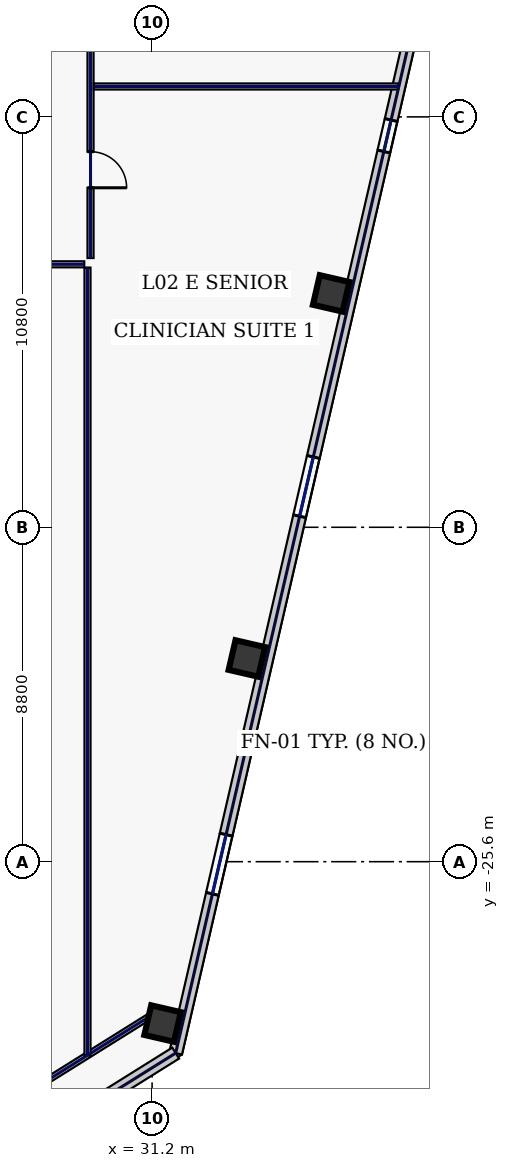
"""IFC4 building model, lengths in metres.
Left out: names, types, materials, properties, quantities, classifications, styles, units other than length and angle.
Written with IfcOpenShell. Run it as: python <this file> out.ifc"""

import sys

from ifc_helpers import new_model, si_unit, direction, frame, frame_2d, origin, origin_2d, place, context, subcontext, project, spatial, rectangle, hollow_rectangle, extrude, element, fill, save


model = new_model("IFC4")
c1 = context("Model", 3, precision=1e-05, world=origin(), true_north=direction((0.0, 1.0)))
c2 = subcontext(c1, "Body", "Model", "MODEL_VIEW")
j1 = project(units=[si_unit("LENGTHUNIT", "METRE"), si_unit("PLANEANGLEUNIT", "RADIAN")], contexts=[c1])
p1 = place(None, origin())
s1 = spatial("IfcSite", under=j1, at=p1, CompositionType="ELEMENT")
p2 = place(p1, origin())
s2 = spatial("IfcBuilding", under=s1, at=p2, CompositionType="ELEMENT")
p3 = place(p2, frame((0.0, 0.0, 13.4)))
s3 = spatial("IfcBuildingStorey", under=s2, at=p3, CompositionType="ELEMENT", Elevation=13.4)
for number, where, z_axis, x_axis in (
    (1, (31.476, -29.86, 0.0), (0.0, 0.0, 1.0), (0.974, -0.225, 0.0)),
    (2, (33.694, -20.252, 0.0), (0.0, 0.0, 1.0), (0.974, -0.225, 0.0)),
    (3, (35.912, -10.645, 0.0), (0.0, 0.0, 1.0), (0.974, -0.225, 0.0)),
):
    element("IfcColumn", number, at=place(p3, frame(where, z_axis=z_axis, x_axis=x_axis)), inside=s3, PredefinedType="COLUMN", context=c2, shape_type="SweptSolid", body=[
        extrude(hollow_rectangle(XDim=0.8, YDim=0.8, WallThickness=0.036, at=origin_2d()), origin(), (0.0, 0.0, 1.0), 4.7),
    ])
p4 = place(p3, frame((31.82, -30.637, 0.0), z_axis=(0.0, 0.0, 1.0), x_axis=(0.224949969076, 0.974370315338, 0.0)))
e4 = element("IfcWall", 4, at=p4, inside=s3, PredefinedType="STANDARD", context=c2, shape_type="SweptSolid", body=[
    extrude(rectangle(XDim=40.8, YDim=0.34, at=frame_2d((20.4, 0.0))), origin(), (0.0, 0.0, 1.0), 4.7),
])
p5 = place(p4, frame((4.3, 0.0, 0.58)))
e5 = element("IfcOpeningElement", 5, at=p5, cuts=e4, PredefinedType="OPENING", context=c2, shape_type="SweptSolid", body=[
    extrude(rectangle(XDim=1.6, YDim=2.3, at=frame_2d((0.8, 1.15))), frame((0.0, 0.18, 0.0), z_axis=(0.0, -1.0, 0.0), x_axis=(1.0, 0.0, 0.0)), (0.0, 0.0, 1.0), 0.36),
])
p6 = place(p4, frame((14.5, 0.0, 0.58)))
e6 = element("IfcOpeningElement", 6, at=p6, cuts=e4, PredefinedType="OPENING", context=c2, shape_type="SweptSolid", body=[
    extrude(rectangle(XDim=1.6, YDim=2.3, at=frame_2d((0.8, 1.15))), frame((0.0, 0.18, 0.0), z_axis=(0.0, -1.0, 0.0), x_axis=(1.0, 0.0, 0.0)), (0.0, 0.0, 1.0), 0.36),
])
p7 = place(p4, frame((24.35, 0.0, 0.75)))
e7 = element("IfcOpeningElement", 7, at=p7, cuts=e4, PredefinedType="OPENING", context=c2, shape_type="SweptSolid", body=[
    extrude(rectangle(XDim=0.85, YDim=1.85, at=frame_2d((0.425, 0.925))), frame((0.0, 0.18, 0.0), z_axis=(0.0, -1.0, 0.0), x_axis=(1.0, 0.0, 0.0)), (0.0, 0.0, 1.0), 0.36),
])
p8 = place(p4, frame((34.55, 0.0, 0.75)))
e8 = element("IfcOpeningElement", 8, at=p8, cuts=e4, PredefinedType="OPENING", context=c2, shape_type="SweptSolid", body=[
    extrude(rectangle(XDim=0.85, YDim=1.85, at=frame_2d((0.425, 0.925))), frame((0.0, 0.18, 0.0), z_axis=(0.0, -1.0, 0.0), x_axis=(1.0, 0.0, 0.0)), (0.0, 0.0, 1.0), 0.36),
])
p9 = place(p3, frame((25.788, -34.406, 0.0), z_axis=(0.0, 0.0, 1.0), x_axis=(0.848046504656, 0.529921811158, 0.0)))
e9 = element("IfcWall", 9, at=p9, inside=s3, PredefinedType="STANDARD", context=c2, shape_type="SweptSolid", body=[
    extrude(rectangle(XDim=7.113, YDim=0.34, at=frame_2d((3.557, 0.0))), origin(), (0.0, 0.0, 1.0), 4.7),
])
p10 = place(p3, frame((25.06, -33.468, 0.0), z_axis=(0.0, 0.0, 1.0), x_axis=(0.848043064089, 0.529927317139, 0.0)))
e10 = element("IfcWall", 10, at=p10, inside=s3, PredefinedType="PARTITIONING", context=c2, shape_type="SweptSolid", body=[
    extrude(rectangle(XDim=7.354, YDim=0.16, at=frame_2d((3.677, 0.0))), origin(), (0.0, 0.0, 1.0), 4.7),
])
p11 = place(p3, frame((29.58, 9.715, 0.0), z_axis=(0.0, 0.0, 1.0), x_axis=(0.0, -1.0, 0.0)))
e11 = element("IfcWall", 11, at=p11, inside=s3, PredefinedType="PARTITIONING", context=c2, shape_type="SweptSolid", body=[
    extrude(rectangle(XDim=19.43, YDim=0.16, at=frame_2d((9.715, 0.0))), origin(), (0.0, 0.0, 1.0), 4.7),
])
p12 = place(p11, frame((16.631, 0.0, 0.0)))
e12 = element("IfcOpeningElement", 12, at=p12, cuts=e11, PredefinedType="OPENING", context=c2, shape_type="SweptSolid", body=[
    extrude(rectangle(XDim=0.95, YDim=2.2, at=frame_2d((0.475, 1.1))), frame((0.0, 0.09, 0.0), z_axis=(0.0, -1.0, 0.0), x_axis=(1.0, 0.0, 0.0)), (0.0, 0.0, 1.0), 0.18),
])
p13 = place(p11, frame((11.925, 0.0, 0.0)))
e13 = element("IfcOpeningElement", 13, at=p13, cuts=e11, PredefinedType="OPENING", context=c2, shape_type="SweptSolid", body=[
    extrude(rectangle(XDim=0.95, YDim=2.2, at=frame_2d((0.475, 1.1))), frame((0.0, 0.09, 0.0), z_axis=(0.0, -1.0, 0.0), x_axis=(1.0, 0.0, 0.0)), (0.0, 0.0, 1.0), 0.18),
])
p14 = place(p11, frame((6.725, 0.0, 0.0)))
e14 = element("IfcOpeningElement", 14, at=p14, cuts=e11, PredefinedType="OPENING", context=c2, shape_type="SweptSolid", body=[
    extrude(rectangle(XDim=0.95, YDim=2.2, at=frame_2d((0.475, 1.1))), frame((0.0, 0.09, 0.0), z_axis=(0.0, -1.0, 0.0), x_axis=(1.0, 0.0, 0.0)), (0.0, 0.0, 1.0), 0.18),
])
p15 = place(p11, frame((2.019, 0.0, 0.0)))
e15 = element("IfcOpeningElement", 15, at=p15, cuts=e11, PredefinedType="OPENING", context=c2, shape_type="SweptSolid", body=[
    extrude(rectangle(XDim=0.95, YDim=2.2, at=frame_2d((0.475, 1.1))), frame((0.0, 0.09, 0.0), z_axis=(0.0, -1.0, 0.0), x_axis=(1.0, 0.0, 0.0)), (0.0, 0.0, 1.0), 0.18),
])
p16 = place(p3, frame((29.415, -9.88, 0.0), z_axis=(0.0, 0.0, 1.0), x_axis=(-1.0, 0.0, 0.0)))
e16 = element("IfcWall", 16, at=p16, inside=s3, PredefinedType="PARTITIONING", context=c2, shape_type="SweptSolid", body=[
    extrude(rectangle(XDim=22.5, YDim=0.16, at=frame_2d((11.25, 0.0))), origin(), (0.0, 0.0, 1.0), 4.7),
])
p17 = place(p16, frame((15.225, 0.0, 0.0)))
e17 = element("IfcOpeningElement", 17, at=p17, cuts=e16, PredefinedType="OPENING", context=c2, shape_type="SweptSolid", body=[
    extrude(rectangle(XDim=0.95, YDim=2.2, at=frame_2d((0.475, 1.1))), frame((0.0, 0.09, 0.0), z_axis=(0.0, -1.0, 0.0), x_axis=(1.0, 0.0, 0.0)), (0.0, 0.0, 1.0), 0.18),
])
p18 = place(p16, frame((10.8, 0.0, 0.0)))
e18 = element("IfcOpeningElement", 18, at=p18, cuts=e16, PredefinedType="OPENING", context=c2, shape_type="SweptSolid", body=[
    extrude(rectangle(XDim=0.95, YDim=2.2, at=frame_2d((0.475, 1.1))), frame((0.0, 0.09, 0.0), z_axis=(0.0, -1.0, 0.0), x_axis=(1.0, 0.0, 0.0)), (0.0, 0.0, 1.0), 0.18),
])
p19 = place(p16, frame((7.2, 0.0, 0.0)))
e19 = element("IfcOpeningElement", 19, at=p19, cuts=e16, PredefinedType="OPENING", context=c2, shape_type="SweptSolid", body=[
    extrude(rectangle(XDim=0.95, YDim=2.2, at=frame_2d((0.475, 1.1))), frame((0.0, 0.09, 0.0), z_axis=(0.0, -1.0, 0.0), x_axis=(1.0, 0.0, 0.0)), (0.0, 0.0, 1.0), 0.18),
])
p20 = place(p16, frame((2.769, 0.0, 0.0)))
e20 = element("IfcOpeningElement", 20, at=p20, cuts=e16, PredefinedType="OPENING", context=c2, shape_type="SweptSolid", body=[
    extrude(rectangle(XDim=0.95, YDim=2.2, at=frame_2d((0.475, 1.1))), frame((0.0, 0.09, 0.0), z_axis=(0.0, -1.0, 0.0), x_axis=(1.0, 0.0, 0.0)), (0.0, 0.0, 1.0), 0.18),
])
p21 = place(p3, frame((29.5, -30.703, 0.0), z_axis=(0.0, 0.0, 1.0), x_axis=(0.0, 1.0, 0.0)))
e21 = element("IfcWall", 21, at=p21, inside=s3, PredefinedType="PARTITIONING", context=c2, shape_type="SweptSolid", body=[
    extrude(rectangle(XDim=20.738, YDim=0.16, at=frame_2d((10.369, 0.0))), origin(), (0.0, 0.0, 1.0), 4.7),
])
p22 = place(p3, frame((29.665, -5.2, 0.0), z_axis=(0.0, 0.0, 1.0), x_axis=(1.0, 0.0, 0.0)))
e22 = element("IfcWall", 22, at=p22, inside=s3, PredefinedType="PARTITIONING", context=c2, shape_type="SweptSolid", body=[
    extrude(rectangle(XDim=8.007, YDim=0.16, at=frame_2d((4.003, 0.0))), origin(), (0.0, 0.0, 1.0), 4.7),
])
p23 = place(p5, origin())
e23 = element("IfcWindow", 23, at=p23, inside=s3, PartitioningType="SINGLE_PANEL", PredefinedType="WINDOW", context=c2, shape_type="SweptSolid", body=[
    extrude(rectangle(XDim=1.6, YDim=2.3, at=frame_2d((0.8, 1.15))), frame((0.0, 0.03, 0.0), z_axis=(0.0, -1.0, 0.0), x_axis=(1.0, 0.0, 0.0)), (0.0, 0.0, 1.0), 0.06),
])
fill(e5, e23)
p24 = place(p6, origin())
e24 = element("IfcWindow", 24, at=p24, inside=s3, PartitioningType="SINGLE_PANEL", PredefinedType="WINDOW", context=c2, shape_type="SweptSolid", body=[
    extrude(rectangle(XDim=1.6, YDim=2.3, at=frame_2d((0.8, 1.15))), frame((0.0, 0.03, 0.0), z_axis=(0.0, -1.0, 0.0), x_axis=(1.0, 0.0, 0.0)), (0.0, 0.0, 1.0), 0.06),
])
fill(e6, e24)
p25 = place(p7, origin())
e25 = element("IfcWindow", 25, at=p25, inside=s3, PartitioningType="SINGLE_PANEL", PredefinedType="WINDOW", context=c2, shape_type="SweptSolid", body=[
    extrude(rectangle(XDim=0.85, YDim=1.85, at=frame_2d((0.425, 0.925))), frame((0.0, 0.03, 0.0), z_axis=(0.0, -1.0, 0.0), x_axis=(1.0, 0.0, 0.0)), (0.0, 0.0, 1.0), 0.06),
])
fill(e7, e25)
p26 = place(p12, origin())
e26 = element("IfcDoor", 26, at=p26, inside=s3, OperationType="SINGLE_SWING_RIGHT", PredefinedType="DOOR", context=c2, shape_type="SweptSolid", body=[
    extrude(rectangle(XDim=0.95, YDim=2.2, at=frame_2d((0.475, 1.1))), frame((0.0, 0.025, 0.0), z_axis=(0.0, -1.0, 0.0), x_axis=(1.0, 0.0, 0.0)), (0.0, 0.0, 1.0), 0.05),
])
fill(e12, e26)
save(model, sys.argv[1])
